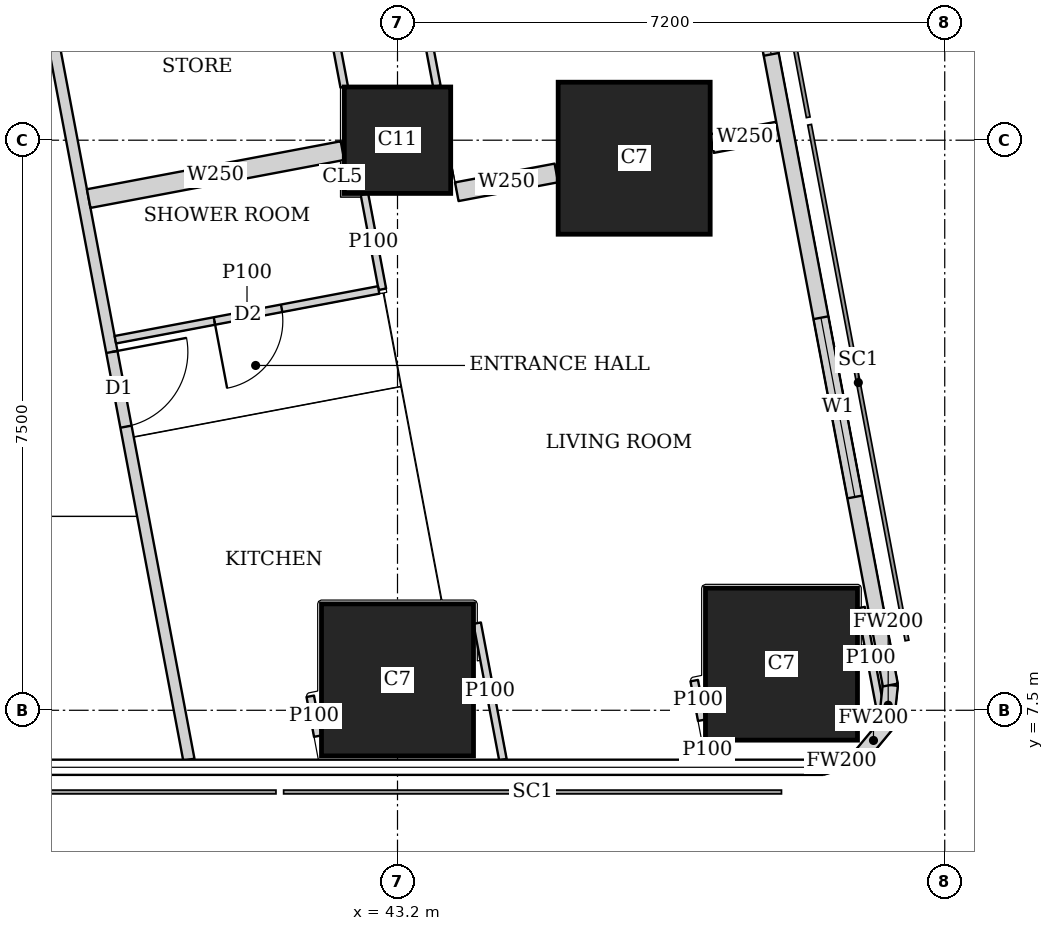
"""IFC4 building model, lengths in metres.
Left out: names, types, materials, properties, quantities, classifications, styles, units other than length and angle.
Written with IfcOpenShell. Run it as: python <this file> out.ifc"""

import sys

from ifc_helpers import new_model, si_unit, direction, frame, frame_2d, origin, origin_2d, place, context, subcontext, project, spatial, rectangle, extrude, element, fill, save


model = new_model("IFC4")
c1 = context("Model", 3, precision=1e-05, world=origin(), true_north=direction((0.0, 1.0)))
c2 = subcontext(c1, "Body", "Model", "MODEL_VIEW")
j1 = project(units=[si_unit("LENGTHUNIT", "METRE"), si_unit("PLANEANGLEUNIT", "RADIAN")], contexts=[c1])
p1 = place(None, origin())
s1 = spatial("IfcSite", under=j1, at=p1, CompositionType="ELEMENT")
p2 = place(p1, origin())
s2 = spatial("IfcBuilding", under=s1, at=p2, CompositionType="ELEMENT")
p3 = place(p2, frame((0.0, 0.0, 274.1)))
s3 = spatial("IfcBuildingStorey", under=s2, at=p3, CompositionType="ELEMENT", Elevation=274.1)
for number, where, z_axis, x_axis in (
    (1, (43.2, 7.9, 0.0), (0.0, 0.0, 1.0), (1.0, 0.0, 0.0)),
    (2, (48.252, 8.107, 0.0), (0.0, 0.0, 1.0), (1.0, 0.0, 0.0)),
):
    element("IfcColumn", number, at=place(p3, frame(where, z_axis=z_axis, x_axis=x_axis)), inside=s3, PredefinedType="COLUMN", context=c2, shape_type="SweptSolid", body=[
        extrude(rectangle(XDim=2.0, YDim=2.0, at=origin_2d()), origin(), (0.0, 0.0, 1.0), 3.75),
    ])
p4 = place(p3, frame((43.2, 15.0, 0.0), z_axis=(0.0, 0.0, 1.0), x_axis=(1.0, 0.0, 0.0)))
e3 = element("IfcColumn", 3, at=p4, inside=s3, PredefinedType="COLUMN", context=c2, shape_type="SweptSolid", body=[
    extrude(rectangle(XDim=1.4, YDim=1.4, at=origin_2d()), origin(), (0.0, 0.0, 1.0), 3.75),
])
p5 = place(p3, frame((46.314, 14.763, 0.0), z_axis=(0.0, 0.0, 1.0), x_axis=(1.0, 0.0, 0.0)))
e4 = element("IfcColumn", 4, at=p5, inside=s3, PredefinedType="COLUMN", context=c2, shape_type="SweptSolid", body=[
    extrude(rectangle(XDim=2.0, YDim=2.0, at=origin_2d()), origin(), (0.0, 0.0, 1.0), 3.75),
])
p6 = place(p3, frame((48.787, 6.75, 0.0), z_axis=(0.0, 0.0, 1.0), x_axis=(0.957282247819, 0.289155145225, 0.0)))
e5 = element("IfcWall", 5, at=p6, inside=s3, PredefinedType="SOLIDWALL", context=c2, shape_type="SweptSolid", body=[
    extrude(rectangle(XDim=0.533, YDim=0.2, at=frame_2d((0.266, 0.0))), origin(), (0.0, 0.0, 1.0), 3.5),
])
p7 = place(p3, frame((49.297, 6.904, 0.0), z_axis=(0.0, 0.0, 1.0), x_axis=(0.639255849474, 0.768994121508, 0.0)))
e6 = element("IfcWall", 6, at=p7, inside=s3, PredefinedType="SOLIDWALL", context=c2, shape_type="SweptSolid", body=[
    extrude(rectangle(XDim=0.518, YDim=0.2, at=frame_2d((0.259, 0.0))), origin(), (0.0, 0.0, 1.0), 3.5),
])
p8 = place(p3, frame((49.628, 7.302, 0.0), z_axis=(0.0, 0.0, 1.0), x_axis=(0.105352390132, 0.994434952068, 0.0)))
e7 = element("IfcWall", 7, at=p8, inside=s3, PredefinedType="SOLIDWALL", context=c2, shape_type="SweptSolid", body=[
    extrude(rectangle(XDim=0.533, YDim=0.2, at=frame_2d((0.267, 0.0))), origin(), (0.0, 0.0, 1.0), 3.5),
])
p9 = place(p3, frame((49.684, 7.832, 0.0), z_axis=(0.0, 0.0, 1.0), x_axis=(-0.185616669694, 0.982622232565, 0.0)))
e8 = element("IfcWall", 8, at=p9, inside=s3, PredefinedType="SOLIDWALL", context=c2, shape_type="SweptSolid", body=[
    extrude(rectangle(XDim=36.0, YDim=0.2, at=frame_2d((18.0, 0.0))), origin(), (0.0, 0.0, 1.0), 3.5),
])
p10 = place(p9, frame((2.518, 0.0, 0.9)))
e9 = element("IfcOpeningElement", 9, at=p10, cuts=e8, PredefinedType="OPENING", context=c2, shape_type="SweptSolid", body=[
    extrude(rectangle(XDim=2.4, YDim=1.5, at=frame_2d((1.2, 0.75))), frame((0.0, 0.11, 0.0), z_axis=(0.0, -1.0, 0.0), x_axis=(1.0, 0.0, 0.0)), (0.0, 0.0, 1.0), 0.22),
])
p11 = place(p9, frame((8.444, 0.0, 0.9)))
e10 = element("IfcOpeningElement", 10, at=p11, cuts=e8, PredefinedType="OPENING", context=c2, shape_type="SweptSolid", body=[
    extrude(rectangle(XDim=1.8, YDim=1.5, at=frame_2d((0.9, 0.75))), frame((0.0, 0.11, 0.0), z_axis=(0.0, -1.0, 0.0), x_axis=(1.0, 0.0, 0.0)), (0.0, 0.0, 1.0), 0.22),
])
p12 = place(p9, frame((12.261, 0.0, 0.9)))
e11 = element("IfcOpeningElement", 11, at=p12, cuts=e8, PredefinedType="OPENING", context=c2, shape_type="SweptSolid", body=[
    extrude(rectangle(XDim=1.8, YDim=1.5, at=frame_2d((0.9, 0.75))), frame((0.0, 0.11, 0.0), z_axis=(0.0, -1.0, 0.0), x_axis=(1.0, 0.0, 0.0)), (0.0, 0.0, 1.0), 0.22),
])
p13 = place(p9, frame((16.078, 0.0, 0.9)))
e12 = element("IfcOpeningElement", 12, at=p13, cuts=e8, PredefinedType="OPENING", context=c2, shape_type="SweptSolid", body=[
    extrude(rectangle(XDim=1.8, YDim=1.5, at=frame_2d((0.9, 0.75))), frame((0.0, 0.11, 0.0), z_axis=(0.0, -1.0, 0.0), x_axis=(1.0, 0.0, 0.0)), (0.0, 0.0, 1.0), 0.22),
])
p14 = place(p9, frame((19.894, 0.0, 0.9)))
e13 = element("IfcOpeningElement", 13, at=p14, cuts=e8, PredefinedType="OPENING", context=c2, shape_type="SweptSolid", body=[
    extrude(rectangle(XDim=1.8, YDim=1.5, at=frame_2d((0.9, 0.75))), frame((0.0, 0.11, 0.0), z_axis=(0.0, -1.0, 0.0), x_axis=(1.0, 0.0, 0.0)), (0.0, 0.0, 1.0), 0.22),
])
p15 = place(p9, frame((23.71, 0.0, 0.9)))
e14 = element("IfcOpeningElement", 14, at=p15, cuts=e8, PredefinedType="OPENING", context=c2, shape_type="SweptSolid", body=[
    extrude(rectangle(XDim=1.8, YDim=1.5, at=frame_2d((0.9, 0.75))), frame((0.0, 0.11, 0.0), z_axis=(0.0, -1.0, 0.0), x_axis=(1.0, 0.0, 0.0)), (0.0, 0.0, 1.0), 0.22),
])
p16 = place(p9, frame((27.526, 0.0, 0.9)))
e15 = element("IfcOpeningElement", 15, at=p16, cuts=e8, PredefinedType="OPENING", context=c2, shape_type="SweptSolid", body=[
    extrude(rectangle(XDim=1.8, YDim=1.5, at=frame_2d((0.9, 0.75))), frame((0.0, 0.11, 0.0), z_axis=(0.0, -1.0, 0.0), x_axis=(1.0, 0.0, 0.0)), (0.0, 0.0, 1.0), 0.22),
])
p17 = place(p9, frame((32.046, 0.0, 0.9)))
e16 = element("IfcOpeningElement", 16, at=p17, cuts=e8, PredefinedType="OPENING", context=c2, shape_type="SweptSolid", body=[
    extrude(rectangle(XDim=1.8, YDim=1.5, at=frame_2d((0.9, 0.75))), frame((0.0, 0.11, 0.0), z_axis=(0.0, -1.0, 0.0), x_axis=(1.0, 0.0, 0.0)), (0.0, 0.0, 1.0), 0.22),
])
p18 = place(p3, frame((33.781, 42.186, 0.0), z_axis=(0.0, 0.0, 1.0), x_axis=(0.185593518645, -0.9826266055, 0.0)))
e17 = element("IfcWall", 17, at=p18, inside=s3, PredefinedType="SOLIDWALL", context=c2, shape_type="SweptSolid", body=[
    extrude(rectangle(XDim=35.961, YDim=0.15, at=frame_2d((17.98, 0.0))), origin(), (0.0, 0.0, 1.0), 2.5),
])
p19 = place(p18, frame((11.76, 0.0, 0.0)))
e18 = element("IfcOpeningElement", 18, at=p19, cuts=e17, PredefinedType="OPENING", context=c2, shape_type="SweptSolid", body=[
    extrude(rectangle(XDim=1.0, YDim=2.1, at=frame_2d((0.5, 1.05))), frame((0.0, 0.085, 0.0), z_axis=(0.0, -1.0, 0.0), x_axis=(1.0, 0.0, 0.0)), (0.0, 0.0, 1.0), 0.17),
])
p20 = place(p18, frame((15.576, 0.0, 0.0)))
e19 = element("IfcOpeningElement", 19, at=p20, cuts=e17, PredefinedType="OPENING", context=c2, shape_type="SweptSolid", body=[
    extrude(rectangle(XDim=1.0, YDim=2.1, at=frame_2d((0.5, 1.05))), frame((0.0, 0.085, 0.0), z_axis=(0.0, -1.0, 0.0), x_axis=(1.0, 0.0, 0.0)), (0.0, 0.0, 1.0), 0.17),
])
p21 = place(p18, frame((30.502, 0.0, 0.0)))
e20 = element("IfcOpeningElement", 20, at=p21, cuts=e17, PredefinedType="OPENING", context=c2, shape_type="SweptSolid", body=[
    extrude(rectangle(XDim=1.0, YDim=2.1, at=frame_2d((0.5, 1.05))), frame((0.0, 0.085, 0.0), z_axis=(0.0, -1.0, 0.0), x_axis=(1.0, 0.0, 0.0)), (0.0, 0.0, 1.0), 0.17),
])
p22 = place(p3, frame((44.248, 8.646, 0.0), z_axis=(0.0, 0.0, 1.0), x_axis=(0.185417594585, -0.982659816833, 0.0)))
e21 = element("IfcWall", 21, at=p22, inside=s3, PredefinedType="PARTITIONING", context=c2, shape_type="SweptSolid", body=[
    extrude(rectangle(XDim=1.828, YDim=0.1, at=frame_2d((0.914, 0.0))), origin(), (0.0, 0.0, 1.0), 2.05),
])
p23 = place(p3, frame((42.151, 7.16, 0.0), z_axis=(0.0, 0.0, 1.0), x_axis=(-0.185366164644, 0.982669519729, 0.0)))
e22 = element("IfcWall", 22, at=p23, inside=s3, PredefinedType="PARTITIONING", context=c2, shape_type="SweptSolid", body=[
    extrude(rectangle(XDim=0.533, YDim=0.1, at=frame_2d((0.267, 0.0))), origin(), (0.0, 0.0, 1.0), 2.5),
])
p24 = place(p3, frame((49.3, 8.851, 0.0), z_axis=(0.0, 0.0, 1.0), x_axis=(0.18581620423, -0.982584519645, 0.0)))
e23 = element("IfcWall", 23, at=p24, inside=s3, PredefinedType="PARTITIONING", context=c2, shape_type="SweptSolid", body=[
    extrude(rectangle(XDim=1.351, YDim=0.1, at=frame_2d((0.675, 0.0))), origin(), (0.0, 0.0, 1.0), 3.5),
])
p25 = place(p3, frame((47.301, 6.85, 0.0), z_axis=(0.0, 0.0, 1.0), x_axis=(-0.187513903188, 0.982261948826, 0.0)))
e24 = element("IfcWall", 24, at=p25, inside=s3, PredefinedType="PARTITIONING", context=c2, shape_type="SweptSolid", body=[
    extrude(rectangle(XDim=0.251, YDim=0.1, at=frame_2d((0.125, 0.0))), origin(), (0.0, 0.0, 1.0), 3.5),
])
p26 = place(p3, frame((47.203, 7.369, 0.0), z_axis=(0.0, 0.0, 1.0), x_axis=(-0.186456243114, 0.982463266185, 0.0)))
e25 = element("IfcWall", 25, at=p26, inside=s3, PredefinedType="PARTITIONING", context=c2, shape_type="SweptSolid", body=[
    extrude(rectangle(XDim=0.53, YDim=0.1, at=frame_2d((0.265, 0.0))), origin(), (0.0, 0.0, 1.0), 2.05),
])
p27 = place(p3, frame((41.894, 25.366, 0.0), z_axis=(0.0, 0.0, 1.0), x_axis=(0.185612905165, -0.982622943675, 0.0)))
e26 = element("IfcWall", 26, at=p27, inside=s3, PredefinedType="PARTITIONING", context=c2, shape_type="SweptSolid", body=[
    extrude(rectangle(XDim=9.827, YDim=0.1, at=frame_2d((4.913, 0.0))), origin(), (0.0, 0.0, 1.0), 2.5),
])
p28 = place(p27, frame((0.151, 0.0, 0.0)))
e27 = element("IfcOpeningElement", 27, at=p28, cuts=e26, PredefinedType="OPENING", context=c2, shape_type="SweptSolid", body=[
    extrude(rectangle(XDim=0.9, YDim=2.1, at=frame_2d((0.45, 1.05))), frame((0.0, 0.06, 0.0), z_axis=(0.0, -1.0, 0.0), x_axis=(1.0, 0.0, 0.0)), (0.0, 0.0, 1.0), 0.12),
])
p29 = place(p27, frame((5.05, 0.0, 0.0)))
e28 = element("IfcOpeningElement", 28, at=p29, cuts=e26, PredefinedType="OPENING", context=c2, shape_type="SweptSolid", body=[
    extrude(rectangle(XDim=0.9, YDim=2.1, at=frame_2d((0.45, 1.05))), frame((0.0, 0.06, 0.0), z_axis=(0.0, -1.0, 0.0), x_axis=(1.0, 0.0, 0.0)), (0.0, 0.0, 1.0), 0.12),
])
p30 = place(p27, frame((7.783, 0.0, 0.0)))
e29 = element("IfcOpeningElement", 29, at=p30, cuts=e26, PredefinedType="OPENING", context=c2, shape_type="SweptSolid", body=[
    extrude(rectangle(XDim=0.9, YDim=2.1, at=frame_2d((0.45, 1.05))), frame((0.0, 0.06, 0.0), z_axis=(0.0, -1.0, 0.0), x_axis=(1.0, 0.0, 0.0)), (0.0, 0.0, 1.0), 0.12),
])
p31 = place(p3, frame((40.706, 25.192, 0.0), z_axis=(0.0, 0.0, 1.0), x_axis=(0.185629824463, -0.982619747547, 0.0)))
e30 = element("IfcWall", 30, at=p31, inside=s3, PredefinedType="PARTITIONING", context=c2, shape_type="SweptSolid", body=[
    extrude(rectangle(XDim=9.659, YDim=0.1, at=frame_2d((4.83, 0.0))), origin(), (0.0, 0.0, 1.0), 2.5),
])
p32 = place(p31, frame((0.575, 0.0, 0.0)))
e31 = element("IfcOpeningElement", 31, at=p32, cuts=e30, PredefinedType="OPENING", context=c2, shape_type="SweptSolid", body=[
    extrude(rectangle(XDim=0.9, YDim=2.1, at=frame_2d((0.45, 1.05))), frame((0.0, 0.06, 0.0), z_axis=(0.0, -1.0, 0.0), x_axis=(1.0, 0.0, 0.0)), (0.0, 0.0, 1.0), 0.12),
])
p33 = place(p31, frame((4.166, 0.0, 0.0)))
e32 = element("IfcOpeningElement", 32, at=p33, cuts=e30, PredefinedType="OPENING", context=c2, shape_type="SweptSolid", body=[
    extrude(rectangle(XDim=0.9, YDim=2.1, at=frame_2d((0.45, 1.05))), frame((0.0, 0.06, 0.0), z_axis=(0.0, -1.0, 0.0), x_axis=(1.0, 0.0, 0.0)), (0.0, 0.0, 1.0), 0.12),
])
p34 = place(p31, frame((2.483, 0.0, 0.0)))
e33 = element("IfcOpeningElement", 33, at=p34, cuts=e30, PredefinedType="OPENING", context=c2, shape_type="SweptSolid", body=[
    extrude(rectangle(XDim=0.9, YDim=2.1, at=frame_2d((0.45, 1.05))), frame((0.0, 0.06, 0.0), z_axis=(0.0, -1.0, 0.0), x_axis=(1.0, 0.0, 0.0)), (0.0, 0.0, 1.0), 0.12),
])
p35 = place(p31, frame((6.074, 0.0, 0.0)))
e34 = element("IfcOpeningElement", 34, at=p35, cuts=e30, PredefinedType="OPENING", context=c2, shape_type="SweptSolid", body=[
    extrude(rectangle(XDim=0.9, YDim=2.1, at=frame_2d((0.45, 1.05))), frame((0.0, 0.06, 0.0), z_axis=(0.0, -1.0, 0.0), x_axis=(1.0, 0.0, 0.0)), (0.0, 0.0, 1.0), 0.12),
])
p36 = place(p3, frame((42.765, 14.29, 0.0), z_axis=(0.0, 0.0, 1.0), x_axis=(0.185446293138, -0.982654401283, 0.0)))
e35 = element("IfcWall", 35, at=p36, inside=s3, PredefinedType="PARTITIONING", context=c2, shape_type="SweptSolid", body=[
    extrude(rectangle(XDim=1.273, YDim=0.1, at=frame_2d((0.636, 0.0))), origin(), (0.0, 0.0, 1.0), 3.5),
])
p37 = place(p3, frame((42.952, 13.03, 0.0), z_axis=(0.0, 0.0, 1.0), x_axis=(-0.982585626838, -0.185810349366, 0.0)))
e36 = element("IfcWall", 36, at=p37, inside=s3, PredefinedType="PARTITIONING", context=c2, shape_type="SweptSolid", body=[
    extrude(rectangle(XDim=3.525, YDim=0.1, at=frame_2d((1.763, 0.0))), origin(), (0.0, 0.0, 1.0), 3.5),
])
p38 = place(p37, frame((1.299, 0.0, 0.0)))
e37 = element("IfcOpeningElement", 37, at=p38, cuts=e36, PredefinedType="OPENING", context=c2, shape_type="SweptSolid", body=[
    extrude(rectangle(XDim=0.9, YDim=2.1, at=frame_2d((0.45, 1.05))), frame((0.0, 0.06, 0.0), z_axis=(0.0, -1.0, 0.0), x_axis=(1.0, 0.0, 0.0)), (0.0, 0.0, 1.0), 0.12),
])
p39 = place(p3, frame((48.206, 15.12, 0.0), z_axis=(0.0, 0.0, 1.0), x_axis=(-0.982608419258, -0.185689780017, 0.0)))
e38 = element("IfcWall", 38, at=p39, inside=s3, PredefinedType="SOLIDWALL", context=c2, shape_type="SweptSolid", body=[
    extrude(rectangle(XDim=0.884, YDim=0.25, at=frame_2d((0.442, 0.0))), origin(), (0.0, 0.0, 1.0), 3.5),
])
p40 = place(p3, frame((45.29, 14.569, 0.0), z_axis=(0.0, 0.0, 1.0), x_axis=(-0.982676759201, -0.185327782391, 0.0)))
e39 = element("IfcWall", 39, at=p40, inside=s3, PredefinedType="SOLIDWALL", context=c2, shape_type="SweptSolid", body=[
    extrude(rectangle(XDim=1.333, YDim=0.25, at=frame_2d((0.667, 0.0))), origin(), (0.0, 0.0, 1.0), 3.5),
])
p41 = place(p3, frame((42.476, 14.863, 0.0), z_axis=(0.0, 0.0, 1.0), x_axis=(-0.982603567712, -0.185715450942, 0.0)))
e40 = element("IfcWall", 40, at=p41, inside=s3, PredefinedType="SOLIDWALL", context=c2, shape_type="SweptSolid", body=[
    extrude(rectangle(XDim=3.398, YDim=0.25, at=frame_2d((1.699, 0.0))), origin(), (0.0, 0.0, 1.0), 3.5),
])
p42 = place(p10, origin())
e41 = element("IfcWindow", 41, at=p42, inside=s3, PartitioningType="SINGLE_PANEL", PredefinedType="WINDOW", context=c2, shape_type="SweptSolid", body=[
    extrude(rectangle(XDim=2.4, YDim=1.5, at=frame_2d((1.2, 0.75))), frame((0.0, 0.03, 0.0), z_axis=(0.0, -1.0, 0.0), x_axis=(1.0, 0.0, 0.0)), (0.0, 0.0, 1.0), 0.06),
])
fill(e9, e41)
p43 = place(p11, origin())
e42 = element("IfcWindow", 42, at=p43, inside=s3, PartitioningType="SINGLE_PANEL", PredefinedType="WINDOW", context=c2, shape_type="SweptSolid", body=[
    extrude(rectangle(XDim=1.8, YDim=1.5, at=frame_2d((0.9, 0.75))), frame((0.0, 0.03, 0.0), z_axis=(0.0, -1.0, 0.0), x_axis=(1.0, 0.0, 0.0)), (0.0, 0.0, 1.0), 0.06),
])
fill(e10, e42)
p44 = place(p38, origin())
e43 = element("IfcDoor", 43, at=p44, inside=s3, OperationType="SINGLE_SWING_RIGHT", PredefinedType="DOOR", context=c2, shape_type="SweptSolid", body=[
    extrude(rectangle(XDim=0.9, YDim=2.1, at=frame_2d((0.45, 1.05))), frame((0.0, 0.025, 0.0), z_axis=(0.0, -1.0, 0.0), x_axis=(1.0, 0.0, 0.0)), (0.0, 0.0, 1.0), 0.05),
])
fill(e37, e43)
p45 = place(p21, origin())
e44 = element("IfcDoor", 44, at=p45, inside=s3, OperationType="SINGLE_SWING_LEFT", PredefinedType="DOOR", context=c2, shape_type="SweptSolid", body=[
    extrude(rectangle(XDim=1.0, YDim=2.1, at=frame_2d((0.5, 1.05))), frame((0.0, 0.025, 0.0), z_axis=(0.0, -1.0, 0.0), x_axis=(1.0, 0.0, 0.0)), (0.0, 0.0, 1.0), 0.05),
])
fill(e20, e44)
save(model, sys.argv[1])
